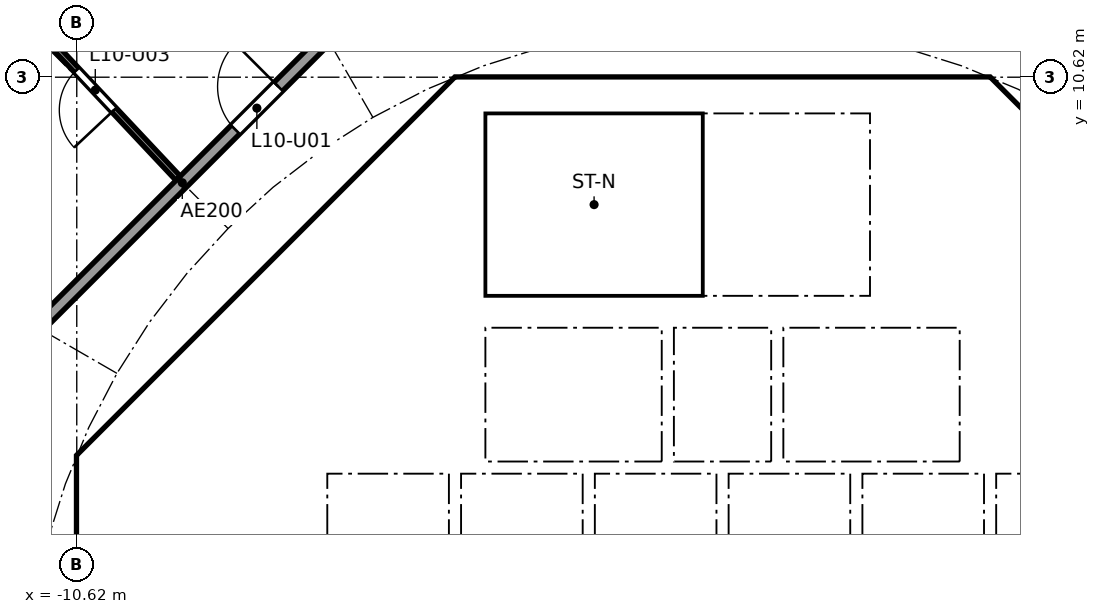
"""IFC4 building model, lengths in metres.
Left out: names, types, materials, properties, quantities, classifications, styles, units other than length and angle.
Written with IfcOpenShell. Run it as: python <this file> out.ifc"""

import sys

from ifc_helpers import new_model, si_unit, direction, frame, frame_2d, origin, place, context, subcontext, project, spatial, polyline, rectangle, outline, extrude, element, fill, save


model = new_model("IFC4")
c1 = context("Model", 3, precision=1e-05, world=origin(), true_north=direction((0.0, 1.0)))
c2 = subcontext(c1, "Body", "Model", "MODEL_VIEW")
j1 = project(units=[si_unit("LENGTHUNIT", "METRE"), si_unit("PLANEANGLEUNIT", "RADIAN")], contexts=[c1])
p1 = place(None, origin())
s1 = spatial("IfcSite", under=j1, at=p1, CompositionType="ELEMENT")
p2 = place(p1, origin())
s2 = spatial("IfcBuilding", under=s1, at=p2, CompositionType="ELEMENT")
p3 = place(p2, frame((0.0, 0.0, 45.5)))
s3 = spatial("IfcBuildingStorey", under=s2, at=p3, CompositionType="ELEMENT", Elevation=45.5)
p4 = place(p3, frame((9.988, 4.613, 0.0), z_axis=(0.0, 0.0, 1.0), x_axis=(-0.707106781187, 0.707106781187, 0.0)))
e1 = element("IfcWall", 1, at=p4, inside=s3, PredefinedType="SHEAR", context=c2, shape_type="SweptSolid", body=[
    extrude(rectangle(XDim=7.602, YDim=0.6, at=frame_2d((3.801, 0.0))), origin(), (0.0, 0.0, 1.0), 3.44),
])
p5 = place(p4, frame((3.201, 0.0, 0.0)))
e2 = element("IfcOpeningElement", 2, at=p5, cuts=e1, PredefinedType="OPENING", context=c2, shape_type="SweptSolid", body=[
    extrude(rectangle(XDim=1.2, YDim=2.1, at=frame_2d((0.6, 1.05))), frame((0.0, 0.31, 0.0), z_axis=(0.0, -1.0, 0.0), x_axis=(1.0, 0.0, 0.0)), (0.0, 0.0, 1.0), 0.62),
])
p6 = place(p3, frame((-4.613, 9.988, 0.0), z_axis=(0.0, 0.0, 1.0), x_axis=(-0.707106781187, -0.707106781187, 0.0)))
e3 = element("IfcWall", 3, at=p6, inside=s3, PredefinedType="SHEAR", context=c2, shape_type="SweptSolid", body=[
    extrude(rectangle(XDim=7.602, YDim=0.6, at=frame_2d((3.801, 0.0))), origin(), (0.0, 0.0, 1.0), 3.44),
])
p7 = place(p6, frame((0.351, 0.0, 0.0)))
e4 = element("IfcOpeningElement", 4, at=p7, cuts=e3, PredefinedType="OPENING", context=c2, shape_type="SweptSolid", body=[
    extrude(rectangle(XDim=1.1, YDim=2.1, at=frame_2d((0.55, 1.05))), frame((0.0, 0.31, 0.0), z_axis=(0.0, -1.0, 0.0), x_axis=(1.0, 0.0, 0.0)), (0.0, 0.0, 1.0), 0.62),
])
p8 = place(p3, frame((-10.325, 3.801, 0.0), z_axis=(0.0, 0.0, 1.0), x_axis=(0.0, -1.0, 0.0)))
e5 = element("IfcWall", 5, at=p8, inside=s3, PredefinedType="SHEAR", context=c2, shape_type="SweptSolid", body=[
    extrude(rectangle(XDim=7.602, YDim=0.6, at=frame_2d((3.801, 0.0))), origin(), (0.0, 0.0, 1.0), 3.44),
])
p9 = place(p8, frame((0.651, 0.0, 0.0)))
e6 = element("IfcOpeningElement", 6, at=p9, cuts=e5, PredefinedType="OPENING", context=c2, shape_type="SweptSolid", body=[
    extrude(rectangle(XDim=1.5, YDim=2.1, at=frame_2d((0.75, 1.05))), frame((0.0, 0.31, 0.0), z_axis=(0.0, -1.0, 0.0), x_axis=(1.0, 0.0, 0.0)), (0.0, 0.0, 1.0), 0.62),
])
p10 = place(p8, frame((5.451, 0.0, 0.0)))
e7 = element("IfcOpeningElement", 7, at=p10, cuts=e5, PredefinedType="OPENING", context=c2, shape_type="SweptSolid", body=[
    extrude(rectangle(XDim=1.5, YDim=2.1, at=frame_2d((0.75, 1.05))), frame((0.0, 0.31, 0.0), z_axis=(0.0, -1.0, 0.0), x_axis=(1.0, 0.0, 0.0)), (0.0, 0.0, 1.0), 0.62),
])
p11 = place(p3, frame((-5.8, 4.3, 0.0), z_axis=(0.0, 0.0, 1.0), x_axis=(0.0, 1.0, 0.0)))
e8 = element("IfcWall", 8, at=p11, inside=s3, PredefinedType="PARTITIONING", context=c2, shape_type="SweptSolid", body=[
    extrude(rectangle(XDim=3.927, YDim=0.15, at=frame_2d((1.963, 0.0))), origin(), (0.0, 0.0, 1.0), 3.44),
])
p12 = place(p11, frame((1.551, 0.0, 0.0)))
e9 = element("IfcOpeningElement", 9, at=p12, cuts=e8, PredefinedType="OPENING", context=c2, shape_type="SweptSolid", body=[
    extrude(rectangle(XDim=0.9, YDim=2.1, at=frame_2d((0.45, 1.05))), frame((0.0, 0.085, 0.0), z_axis=(0.0, -1.0, 0.0), x_axis=(1.0, 0.0, 0.0)), (0.0, 0.0, 1.0), 0.17),
])
p13 = place(p3, frame((4.0, 4.3, 0.0), z_axis=(0.0, 0.0, 1.0), x_axis=(0.0, 1.0, 0.0)))
e10 = element("IfcWall", 10, at=p13, inside=s3, PredefinedType="SOLIDWALL", context=c2, shape_type="SweptSolid", body=[
    extrude(rectangle(XDim=2.2, YDim=0.2, at=frame_2d((1.1, 0.0))), origin(), (0.0, 0.0, 1.0), 3.44),
])
p14 = place(p13, frame((0.55, 0.0, 0.0)))
e11 = element("IfcOpeningElement", 11, at=p14, cuts=e10, PredefinedType="OPENING", context=c2, shape_type="SweptSolid", body=[
    extrude(rectangle(XDim=1.1, YDim=2.1, at=frame_2d((0.55, 1.05))), frame((0.0, 0.11, 0.0), z_axis=(0.0, -1.0, 0.0), x_axis=(1.0, 0.0, 0.0)), (0.0, 0.0, 1.0), 0.22),
])
p15 = place(p3, frame((-4.0, 4.3, 0.0), z_axis=(0.0, 0.0, 1.0), x_axis=(0.0, 1.0, 0.0)))
e12 = element("IfcWall", 12, at=p15, inside=s3, PredefinedType="SOLIDWALL", context=c2, shape_type="SweptSolid", body=[
    extrude(rectangle(XDim=2.2, YDim=0.2, at=frame_2d((1.1, 0.0))), origin(), (0.0, 0.0, 1.0), 3.44),
])
p16 = place(p15, frame((0.55, 0.0, 0.0)))
e13 = element("IfcOpeningElement", 13, at=p16, cuts=e12, PredefinedType="OPENING", context=c2, shape_type="SweptSolid", body=[
    extrude(rectangle(XDim=1.1, YDim=2.1, at=frame_2d((0.55, 1.05))), frame((0.0, 0.11, 0.0), z_axis=(0.0, -1.0, 0.0), x_axis=(1.0, 0.0, 0.0)), (0.0, 0.0, 1.0), 0.22),
])
p17 = place(p3, frame((4.0, 7.025, 0.0), z_axis=(0.0, 0.0, 1.0), x_axis=(0.0, 1.0, 0.0)))
e14 = element("IfcWall", 14, at=p17, inside=s3, PredefinedType="SOLIDWALL", context=c2, shape_type="SweptSolid", body=[
    extrude(rectangle(XDim=3.0, YDim=0.2, at=frame_2d((1.5, 0.0))), origin(), (0.0, 0.0, 1.0), 3.44),
])
p18 = place(p17, frame((0.925, 0.0, 0.0)))
e15 = element("IfcOpeningElement", 15, at=p18, cuts=e14, PredefinedType="OPENING", context=c2, shape_type="SweptSolid", body=[
    extrude(rectangle(XDim=1.1, YDim=2.1, at=frame_2d((0.55, 1.05))), frame((0.0, 0.11, 0.0), z_axis=(0.0, -1.0, 0.0), x_axis=(1.0, 0.0, 0.0)), (0.0, 0.0, 1.0), 0.22),
])
p19 = place(p3, origin())
e16 = element("IfcWall", 16, at=p19, inside=s3, PredefinedType="SHEAR", context=c2, shape_type="SweptSolid", body=[
    extrude(outline(polyline([(-10.2, 4.825), (-9.776, 4.401), (-10.025, 4.152), (-10.025, 3.801), (-10.625, 3.801), (-10.625, 4.401), (-10.2, 4.825)])), origin(), (0.0, 0.0, 1.0), 3.44),
])
p20 = place(p3, origin())
e17 = element("IfcWall", 17, at=p20, inside=s3, PredefinedType="SHEAR", context=c2, shape_type="SweptSolid", body=[
    extrude(outline(polyline([(-4.152, 10.025), (-4.401, 9.776), (-4.825, 10.2), (-4.401, 10.625), (4.401, 10.625), (4.825, 10.2), (4.401, 9.776), (4.152, 10.025), (-4.152, 10.025)])), origin(), (0.0, 0.0, 1.0), 3.44),
])
for number, where, z_axis, x_axis in (
    (18, (-0.9, 4.3, 0.0), (0.0, 0.0, 1.0), (0.0, 1.0, 0.0)),
    (19, (0.9, 4.3, 0.0), (0.0, 0.0, 1.0), (0.0, 1.0, 0.0)),
):
    element("IfcWall", number, at=place(p3, frame(where, z_axis=z_axis, x_axis=x_axis)), inside=s3, PredefinedType="SOLIDWALL", context=c2, shape_type="SweptSolid", body=[
        extrude(rectangle(XDim=2.2, YDim=0.2, at=frame_2d((1.1, 0.0))), origin(), (0.0, 0.0, 1.0), 3.44),
    ])
p21 = place(p3, origin())
e20 = element("IfcWall", 20, at=p21, inside=s3, PredefinedType="SOLIDWALL", context=c2, shape_type="SweptSolid", body=[
    extrude(outline(polyline([(-6.5, 2.1), (-6.7, 2.1), (-6.7, 4.3), (6.7, 4.3), (6.7, 2.1), (6.5, 2.1), (6.5, 4.1), (4.5, 4.1), (4.5, 2.1), (4.3, 2.1), (4.3, 4.1), (2.3, 4.1), (2.3, 2.1), (2.1, 2.1), (2.1, 4.1), (0.1, 4.1), (0.1, 2.1), (-0.1, 2.1), (-0.1, 4.1), (-2.1, 4.1), (-2.1, 2.1), (-2.3, 2.1), (-2.3, 4.1), (-4.3, 4.1), (-4.3, 2.1), (-4.5, 2.1), (-4.5, 4.1), (-6.5, 4.1), (-6.5, 2.1)])), origin(), (0.0, 0.0, 1.0), 3.44),
])
p22 = place(p3, frame((-10.025, 4.0, 0.0), z_axis=(0.0, 0.0, 1.0), x_axis=(1.0, 0.0, 0.0)))
e21 = element("IfcWall", 21, at=p22, inside=s3, PredefinedType="PARTITIONING", context=c2, shape_type="SweptSolid", body=[
    extrude(rectangle(XDim=3.325, YDim=0.2, at=frame_2d((1.662, 0.0))), origin(), (0.0, 0.0, 1.0), 3.44),
])
p23 = place(p3, origin())
e22 = element("IfcWall", 22, at=p23, inside=s3, PredefinedType="SOLIDWALL", context=c2, shape_type="SweptSolid", body=[
    extrude(outline(polyline([(-3.9, 7.025), (-4.1, 7.025), (-4.1, 10.025), (-3.9, 10.025), (-3.9, 7.025)])), origin(), (0.0, 0.0, 1.0), 3.44),
])
p24 = place(p3, origin())
e23 = element("IfcWall", 23, at=p24, inside=s3, PredefinedType="SOLIDWALL", context=c2, shape_type="SweptSolid", body=[
    extrude(outline(polyline([(4.1, 6.5), (-4.1, 6.5), (-4.1, 7.025), (4.1, 7.025), (4.1, 6.5)])), origin(), (0.0, 0.0, 1.0), 3.44),
])
p25 = place(p3, frame((-5.275, 12.494, 0.0), z_axis=(0.0, 0.0, 1.0), x_axis=(-0.707106781187, -0.707106781187, 0.0)))
e24 = element("IfcWall", 24, at=p25, inside=s3, PredefinedType="PARTITIONING", context=c2, shape_type="SweptSolid", body=[
    extrude(rectangle(XDim=10.209, YDim=0.2, at=frame_2d((5.104, 0.0))), origin(), (0.0, 0.0, 1.0), 3.44),
])
p26 = place(p25, frame((2.87, 0.0, 0.0)))
e25 = element("IfcOpeningElement", 25, at=p26, cuts=e24, PredefinedType="OPENING", context=c2, shape_type="SweptSolid", body=[
    extrude(rectangle(XDim=1.0, YDim=2.1, at=frame_2d((0.5, 1.05))), frame((0.0, 0.11, 0.0), z_axis=(0.0, -1.0, 0.0), x_axis=(1.0, 0.0, 0.0)), (0.0, 0.0, 1.0), 0.22),
])
p27 = place(p3, frame((-8.953, 8.958, 0.0), z_axis=(0.0, 0.0, 1.0), x_axis=(-0.684574307023, 0.728943082939, 0.0)))
e26 = element("IfcWall", 26, at=p27, inside=s3, PredefinedType="PARTITIONING", context=c2, shape_type="SweptSolid", body=[
    extrude(rectangle(XDim=15.231, YDim=0.1, at=frame_2d((7.615, 0.0))), origin(), (0.0, 0.0, 1.0), 2.687),
])
p28 = place(p27, frame((1.54, 0.0, 0.0)))
e27 = element("IfcOpeningElement", 27, at=p28, cuts=e26, PredefinedType="OPENING", context=c2, shape_type="SweptSolid", body=[
    extrude(rectangle(XDim=0.9, YDim=2.1, at=frame_2d((0.45, 1.05))), frame((0.0, 0.06, 0.0), z_axis=(0.0, -1.0, 0.0), x_axis=(1.0, 0.0, 0.0)), (0.0, 0.0, 1.0), 0.12),
])
p29 = place(p27, frame((6.174, 0.0, 0.0)))
e28 = element("IfcOpeningElement", 28, at=p29, cuts=e26, PredefinedType="OPENING", context=c2, shape_type="SweptSolid", body=[
    extrude(rectangle(XDim=0.9, YDim=2.1, at=frame_2d((0.45, 1.05))), frame((0.0, 0.06, 0.0), z_axis=(0.0, -1.0, 0.0), x_axis=(1.0, 0.0, 0.0)), (0.0, 0.0, 1.0), 0.12),
])
p30 = place(p27, frame((11.8, 0.0, 0.0)))
e29 = element("IfcOpeningElement", 29, at=p30, cuts=e26, PredefinedType="OPENING", context=c2, shape_type="SweptSolid", body=[
    extrude(rectangle(XDim=0.9, YDim=2.1, at=frame_2d((0.45, 1.05))), frame((0.0, 0.06, 0.0), z_axis=(0.0, -1.0, 0.0), x_axis=(1.0, 0.0, 0.0)), (0.0, 0.0, 1.0), 0.12),
])
p31 = place(p14, origin())
e30 = element("IfcDoor", 30, at=p31, inside=s3, OperationType="DOUBLE_DOOR_SLIDING", PredefinedType="DOOR", context=c2, shape_type="SweptSolid", body=[
    extrude(rectangle(XDim=1.1, YDim=2.1, at=frame_2d((0.55, 1.05))), frame((0.0, 0.025, 0.0), z_axis=(0.0, -1.0, 0.0), x_axis=(1.0, 0.0, 0.0)), (0.0, 0.0, 1.0), 0.05),
])
fill(e11, e30)
p32 = place(p16, origin())
e31 = element("IfcDoor", 31, at=p32, inside=s3, OperationType="DOUBLE_DOOR_SLIDING", PredefinedType="DOOR", context=c2, shape_type="SweptSolid", body=[
    extrude(rectangle(XDim=1.1, YDim=2.1, at=frame_2d((0.55, 1.05))), frame((0.0, 0.025, 0.0), z_axis=(0.0, -1.0, 0.0), x_axis=(1.0, 0.0, 0.0)), (0.0, 0.0, 1.0), 0.05),
])
fill(e13, e31)
p33 = place(p18, origin())
e32 = element("IfcDoor", 32, at=p33, inside=s3, OperationType="SINGLE_SWING_LEFT", PredefinedType="DOOR", context=c2, shape_type="SweptSolid", body=[
    extrude(rectangle(XDim=1.1, YDim=2.1, at=frame_2d((0.55, 1.05))), frame((0.0, 0.025, 0.0), z_axis=(0.0, -1.0, 0.0), x_axis=(1.0, 0.0, 0.0)), (0.0, 0.0, 1.0), 0.05),
])
fill(e15, e32)
p34 = place(p12, origin())
e33 = element("IfcDoor", 33, at=p34, inside=s3, OperationType="SINGLE_SWING_RIGHT", PredefinedType="DOOR", context=c2, shape_type="SweptSolid", body=[
    extrude(rectangle(XDim=0.9, YDim=2.1, at=frame_2d((0.45, 1.05))), frame((0.0, 0.025, 0.0), z_axis=(0.0, -1.0, 0.0), x_axis=(1.0, 0.0, 0.0)), (0.0, 0.0, 1.0), 0.05),
])
fill(e9, e33)
p35 = place(p9, origin())
e34 = element("IfcDoor", 34, at=p35, inside=s3, OperationType="DOUBLE_DOOR_SINGLE_SWING", PredefinedType="DOOR", context=c2, shape_type="SweptSolid", body=[
    extrude(rectangle(XDim=1.5, YDim=2.1, at=frame_2d((0.75, 1.05))), frame((0.0, 0.025, 0.0), z_axis=(0.0, -1.0, 0.0), x_axis=(1.0, 0.0, 0.0)), (0.0, 0.0, 1.0), 0.05),
])
fill(e6, e34)
p36 = place(p7, origin())
e35 = element("IfcDoor", 35, at=p36, inside=s3, OperationType="SINGLE_SWING_RIGHT", PredefinedType="DOOR", context=c2, shape_type="SweptSolid", body=[
    extrude(rectangle(XDim=1.1, YDim=2.1, at=frame_2d((0.55, 1.05))), frame((0.0, 0.025, 0.0), z_axis=(0.0, -1.0, 0.0), x_axis=(1.0, 0.0, 0.0)), (0.0, 0.0, 1.0), 0.05),
])
fill(e4, e35)
p37 = place(p26, frame((1.0, 0.0, 0.0), x_axis=(-1.0, 0.0, 0.0)))
e36 = element("IfcDoor", 36, at=p37, inside=s3, OperationType="SINGLE_SWING_RIGHT", PredefinedType="DOOR", context=c2, shape_type="SweptSolid", body=[
    extrude(rectangle(XDim=1.0, YDim=2.1, at=frame_2d((0.5, 1.05))), frame((0.0, 0.025, 0.0), z_axis=(0.0, -1.0, 0.0), x_axis=(1.0, 0.0, 0.0)), (0.0, 0.0, 1.0), 0.05),
])
fill(e25, e36)
p38 = place(p28, origin())
e37 = element("IfcDoor", 37, at=p38, inside=s3, OperationType="SINGLE_SWING_LEFT", PredefinedType="DOOR", context=c2, shape_type="SweptSolid", body=[
    extrude(rectangle(XDim=0.9, YDim=2.1, at=frame_2d((0.45, 1.05))), frame((0.0, 0.025, 0.0), z_axis=(0.0, -1.0, 0.0), x_axis=(1.0, 0.0, 0.0)), (0.0, 0.0, 1.0), 0.05),
])
fill(e27, e37)
save(model, sys.argv[1])
